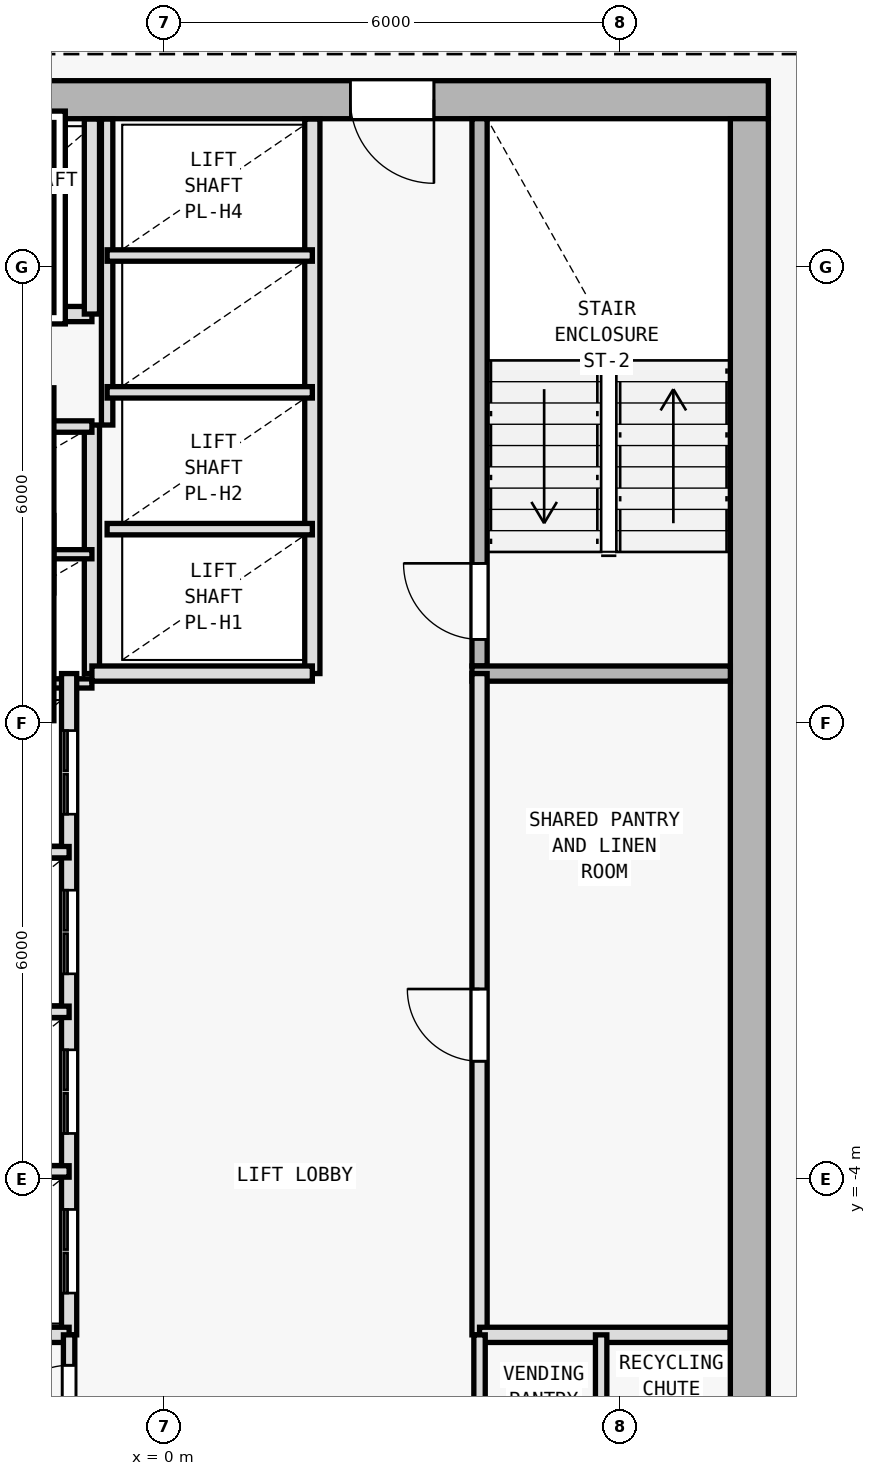
"""IFC4 building model, lengths in metres.
Left out: names, types, materials, properties, quantities, classifications, styles, units other than length and angle.
Written with IfcOpenShell. Run it as: python <this file> out.ifc"""

import sys

from ifc_helpers import new_model, si_unit, direction, frame, frame_2d, origin, origin_2d, place, context, subcontext, project, spatial, rectangle, i_section, extrude, element, fill, save


model = new_model("IFC4")
c1 = context("Model", 3, precision=1e-05, world=origin(), true_north=direction((0.0, 1.0)))
c2 = subcontext(c1, "Body", "Model", "MODEL_VIEW")
j1 = project(units=[si_unit("LENGTHUNIT", "METRE"), si_unit("PLANEANGLEUNIT", "RADIAN")], contexts=[c1])
p1 = place(None, origin())
s1 = spatial("IfcSite", under=j1, at=p1, CompositionType="ELEMENT")
p2 = place(p1, origin())
s2 = spatial("IfcBuilding", under=s1, at=p2, CompositionType="ELEMENT")
p3 = place(p2, frame((0.0, 0.0, 167.4)))
s3 = spatial("IfcBuildingStorey", under=s2, at=p3, CompositionType="ELEMENT", Elevation=167.4)
for number, where, z_axis, x_axis in (
    (1, (7.7, 10.2, 0.0), (0.0, 0.0, 1.0), (1.0, 0.0, 0.0)),
    (2, (7.7, 0.4, 0.0), (0.0, 0.0, 1.0), (1.0, 0.0, 0.0)),
):
    element("IfcColumn", number, at=place(p3, frame(where, z_axis=z_axis, x_axis=x_axis)), inside=s3, PredefinedType="COLUMN", context=c2, shape_type="SweptSolid", body=[
        extrude(i_section(OverallWidth=0.404, OverallDepth=0.407, WebThickness=0.017, FlangeThickness=0.028, FilletRadius=0.015, at=origin_2d()), origin(), (0.0, 0.0, 1.0), 3.6),
    ])
p4 = place(p3, frame((7.95, 10.2, 0.0), z_axis=(0.0, 0.0, 1.0), x_axis=(-1.0, 0.0, 0.0)))
e3 = element("IfcWall", 3, at=p4, inside=s3, PredefinedType="SHEAR", context=c2, shape_type="SweptSolid", body=[
    extrude(rectangle(XDim=15.9, YDim=0.5, at=frame_2d((7.95, 0.0))), origin(), (0.0, 0.0, 1.0), 3.35),
])
p5 = place(p4, frame((4.4, 0.0, 0.0)))
e4 = element("IfcOpeningElement", 4, at=p5, cuts=e3, PredefinedType="OPENING", context=c2, shape_type="SweptSolid", body=[
    extrude(rectangle(XDim=1.1, YDim=2.15, at=frame_2d((0.55, 1.075))), frame((0.0, 0.26, 0.0), z_axis=(0.0, -1.0, 0.0), x_axis=(1.0, 0.0, 0.0)), (0.0, 0.0, 1.0), 0.52),
])
p6 = place(p3, frame((7.7, 9.95, 0.0), z_axis=(0.0, 0.0, 1.0), x_axis=(0.0, -1.0, 0.0)))
e5 = element("IfcWall", 5, at=p6, inside=s3, PredefinedType="SHEAR", context=c2, shape_type="SweptSolid", body=[
    extrude(rectangle(XDim=19.1, YDim=0.5, at=frame_2d((9.55, 0.0))), origin(), (0.0, 0.0, 1.0), 3.35),
])
p7 = place(p3, frame((4.15, 2.75, 0.0), z_axis=(0.0, 0.0, 1.0), x_axis=(0.0, 1.0, 0.0)))
e6 = element("IfcWall", 6, at=p7, inside=s3, PredefinedType="SOLIDWALL", context=c2, shape_type="SweptSolid", body=[
    extrude(rectangle(XDim=7.2, YDim=0.2, at=frame_2d((3.6, 0.0))), origin(), (0.0, 0.0, 1.0), 3.35),
])
p8 = place(p7, frame((0.35, 0.0, 0.0)))
e7 = element("IfcOpeningElement", 7, at=p8, cuts=e6, PredefinedType="OPENING", context=c2, shape_type="SweptSolid", body=[
    extrude(rectangle(XDim=1.0, YDim=2.15, at=frame_2d((0.5, 1.075))), frame((0.0, 0.11, 0.0), z_axis=(0.0, -1.0, 0.0), x_axis=(1.0, 0.0, 0.0)), (0.0, 0.0, 1.0), 0.22),
])
p9 = place(p3, frame((4.05, 2.65, 0.0), z_axis=(0.0, 0.0, 1.0), x_axis=(1.0, 0.0, 0.0)))
e8 = element("IfcWall", 8, at=p9, inside=s3, PredefinedType="SOLIDWALL", context=c2, shape_type="SweptSolid", body=[
    extrude(rectangle(XDim=3.4, YDim=0.2, at=frame_2d((1.7, 0.0))), origin(), (0.0, 0.0, 1.0), 3.35),
])
p10 = place(p3, frame((-0.95, 2.65, 0.0), z_axis=(0.0, 0.0, 1.0), x_axis=(0.0, 1.0, 0.0)))
e9 = element("IfcWall", 9, at=p10, inside=s3, PredefinedType="SOLIDWALL", context=c2, shape_type="SweptSolid", body=[
    extrude(rectangle(XDim=3.27, YDim=0.2, at=frame_2d((1.635, 0.0))), origin(), (0.0, 0.0, 1.0), 3.35),
])
for number, where, z_axis, x_axis in (
    (10, (-3.85, 2.52, 0.0), (0.0, 0.0, 1.0), (1.0, 0.0, 0.0)),
    (11, (-3.85, 4.22, 0.0), (0.0, 0.0, 1.0), (1.0, 0.0, 0.0)),
):
    element("IfcWall", number, at=place(p3, frame(where, z_axis=z_axis, x_axis=x_axis)), inside=s3, PredefinedType="PARTITIONING", context=c2, shape_type="SweptSolid", body=[
        extrude(rectangle(XDim=2.9, YDim=0.12, at=frame_2d((1.45, 0.0))), origin(), (0.0, 0.0, 1.0), 3.35),
    ])
p11 = place(p3, frame((-3.85, 5.9, 0.0), z_axis=(0.0, 0.0, 1.0), x_axis=(1.0, 0.0, 0.0)))
e12 = element("IfcWall", 12, at=p11, inside=s3, PredefinedType="PARTITIONING", context=c2, shape_type="SweptSolid", body=[
    extrude(rectangle(XDim=2.9, YDim=0.15, at=frame_2d((1.45, 0.0))), origin(), (0.0, 0.0, 1.0), 3.35),
])
p12 = place(p3, frame((-3.85, 7.38, 0.0), z_axis=(0.0, 0.0, 1.0), x_axis=(1.0, 0.0, 0.0)))
e13 = element("IfcWall", 13, at=p12, inside=s3, PredefinedType="SOLIDWALL", context=c2, shape_type="SweptSolid", body=[
    extrude(rectangle(XDim=2.9, YDim=0.2, at=frame_2d((1.45, 0.0))), origin(), (0.0, 0.0, 1.0), 3.35),
])
p13 = place(p12, frame((0.85, 0.0, 0.0)))
e14 = element("IfcOpeningElement", 14, at=p13, cuts=e13, PredefinedType="OPENING", context=c2, shape_type="SweptSolid", body=[
    extrude(rectangle(XDim=1.2, YDim=2.2, at=frame_2d((0.6, 1.1))), frame((0.0, 0.11, 0.0), z_axis=(0.0, -1.0, 0.0), x_axis=(1.0, 0.0, 0.0)), (0.0, 0.0, 1.0), 0.22),
])
p14 = place(p3, frame((-0.95, 7.38, 0.0), z_axis=(0.0, 0.0, 1.0), x_axis=(0.0, 1.0, 0.0)))
e15 = element("IfcWall", 15, at=p14, inside=s3, PredefinedType="SOLIDWALL", context=c2, shape_type="SweptSolid", body=[
    extrude(rectangle(XDim=2.565, YDim=0.2, at=frame_2d((1.283, 0.0))), origin(), (0.0, 0.0, 1.0), 3.35),
])
p15 = place(p3, frame((4.15, -6.05, 0.0), z_axis=(0.0, 0.0, 1.0), x_axis=(0.0, 1.0, 0.0)))
e16 = element("IfcWall", 16, at=p15, inside=s3, PredefinedType="SOLIDWALL", context=c2, shape_type="SweptSolid", body=[
    extrude(rectangle(XDim=8.7, YDim=0.2, at=frame_2d((4.35, 0.0))), origin(), (0.0, 0.0, 1.0), 3.35),
])
p16 = place(p15, frame((3.6, 0.0, 0.0)))
e17 = element("IfcOpeningElement", 17, at=p16, cuts=e16, PredefinedType="OPENING", context=c2, shape_type="SweptSolid", body=[
    extrude(rectangle(XDim=0.95, YDim=2.1, at=frame_2d((0.475, 1.05))), frame((0.0, 0.11, 0.0), z_axis=(0.0, -1.0, 0.0), x_axis=(1.0, 0.0, 0.0)), (0.0, 0.0, 1.0), 0.22),
])
p17 = place(p3, frame((-1.25, -6.05, 0.0), z_axis=(0.0, 0.0, 1.0), x_axis=(0.0, 1.0, 0.0)))
e18 = element("IfcWall", 18, at=p17, inside=s3, PredefinedType="SOLIDWALL", context=c2, shape_type="SweptSolid", body=[
    extrude(rectangle(XDim=8.7, YDim=0.2, at=frame_2d((4.35, 0.0))), origin(), (0.0, 0.0, 1.0), 3.35),
])
p18 = place(p17, frame((0.55, 0.0, 0.0)))
e19 = element("IfcOpeningElement", 19, at=p18, cuts=e18, PredefinedType="OPENING", context=c2, shape_type="SweptSolid", body=[
    extrude(rectangle(XDim=1.1, YDim=2.15, at=frame_2d((0.55, 1.075))), frame((0.0, 0.11, 0.0), z_axis=(0.0, -1.0, 0.0), x_axis=(1.0, 0.0, 0.0)), (0.0, 0.0, 1.0), 0.22),
])
p19 = place(p17, frame((2.65, 0.0, 0.0)))
e20 = element("IfcOpeningElement", 20, at=p19, cuts=e18, PredefinedType="OPENING", context=c2, shape_type="SweptSolid", body=[
    extrude(rectangle(XDim=1.1, YDim=2.15, at=frame_2d((0.55, 1.075))), frame((0.0, 0.11, 0.0), z_axis=(0.0, -1.0, 0.0), x_axis=(1.0, 0.0, 0.0)), (0.0, 0.0, 1.0), 0.22),
])
p20 = place(p17, frame((4.75, 0.0, 0.0)))
e21 = element("IfcOpeningElement", 21, at=p20, cuts=e18, PredefinedType="OPENING", context=c2, shape_type="SweptSolid", body=[
    extrude(rectangle(XDim=1.1, YDim=2.15, at=frame_2d((0.55, 1.075))), frame((0.0, 0.11, 0.0), z_axis=(0.0, -1.0, 0.0), x_axis=(1.0, 0.0, 0.0)), (0.0, 0.0, 1.0), 0.22),
])
p21 = place(p17, frame((6.85, 0.0, 0.0)))
e22 = element("IfcOpeningElement", 22, at=p21, cuts=e18, PredefinedType="OPENING", context=c2, shape_type="SweptSolid", body=[
    extrude(rectangle(XDim=1.1, YDim=2.15, at=frame_2d((0.55, 1.075))), frame((0.0, 0.11, 0.0), z_axis=(0.0, -1.0, 0.0), x_axis=(1.0, 0.0, 0.0)), (0.0, 0.0, 1.0), 0.22),
])
for number, where, z_axis, x_axis in (
    (23, (-4.15, -3.9, 0.0), (0.0, 0.0, 1.0), (1.0, 0.0, 0.0)),
    (24, (-4.15, -1.8, 0.0), (0.0, 0.0, 1.0), (1.0, 0.0, 0.0)),
    (25, (-4.15, 0.3, 0.0), (0.0, 0.0, 1.0), (1.0, 0.0, 0.0)),
):
    element("IfcWall", number, at=place(p3, frame(where, z_axis=z_axis, x_axis=x_axis)), inside=s3, PredefinedType="PARTITIONING", context=c2, shape_type="SweptSolid", body=[
        extrude(rectangle(XDim=2.9, YDim=0.15, at=frame_2d((1.45, 0.0))), origin(), (0.0, 0.0, 1.0), 3.35),
    ])
p22 = place(p3, frame((1.95, 2.65, 0.0), z_axis=(0.0, 0.0, 1.0), x_axis=(0.0, 1.0, 0.0)))
e26 = element("IfcWall", 26, at=p22, inside=s3, PredefinedType="SOLIDWALL", context=c2, shape_type="SweptSolid", body=[
    extrude(rectangle(XDim=7.295, YDim=0.2, at=frame_2d((3.647, 0.0))), origin(), (0.0, 0.0, 1.0), 3.35),
])
p23 = place(p3, frame((-0.95, 2.65, 0.0), z_axis=(0.0, 0.0, 1.0), x_axis=(1.0, 0.0, 0.0)))
e27 = element("IfcWall", 27, at=p23, inside=s3, PredefinedType="SOLIDWALL", context=c2, shape_type="SweptSolid", body=[
    extrude(rectangle(XDim=2.9, YDim=0.2, at=frame_2d((1.45, 0.0))), origin(), (0.0, 0.0, 1.0), 3.35),
])
p24 = place(p3, frame((-0.75, 5.92, 0.0), z_axis=(0.0, 0.0, 1.0), x_axis=(0.0, 1.0, 0.0)))
e28 = element("IfcWall", 28, at=p24, inside=s3, PredefinedType="PARTITIONING", context=c2, shape_type="SweptSolid", body=[
    extrude(rectangle(XDim=4.025, YDim=0.15, at=frame_2d((2.013, 0.0))), origin(), (0.0, 0.0, 1.0), 3.35),
])
for number, where, z_axis, x_axis in (
    (29, (-0.75, 4.55, 0.0), (0.0, 0.0, 1.0), (1.0, 0.0, 0.0)),
    (30, (-0.75, 6.35, 0.0), (0.0, 0.0, 1.0), (1.0, 0.0, 0.0)),
    (31, (-0.75, 8.15, 0.0), (0.0, 0.0, 1.0), (1.0, 0.0, 0.0)),
):
    element("IfcWall", number, at=place(p3, frame(where, z_axis=z_axis, x_axis=x_axis)), inside=s3, PredefinedType="PARTITIONING", context=c2, shape_type="SweptSolid", body=[
        extrude(rectangle(XDim=2.7, YDim=0.15, at=frame_2d((1.35, 0.0))), origin(), (0.0, 0.0, 1.0), 3.35),
    ])
p25 = place(p3, frame((-4.04, -6.05, 0.0), z_axis=(0.0, 0.0, 1.0), x_axis=(1.0, 0.0, 0.0)))
e32 = element("IfcWall", 32, at=p25, inside=s3, PredefinedType="SOLIDWALL", context=c2, shape_type="SweptSolid", body=[
    extrude(rectangle(XDim=2.79, YDim=0.2, at=frame_2d((1.395, 0.0))), origin(), (0.0, 0.0, 1.0), 3.35),
])
p26 = place(p3, frame((4.15, -6.05, 0.0), z_axis=(0.0, 0.0, 1.0), x_axis=(1.0, 0.0, 0.0)))
e33 = element("IfcWall", 33, at=p26, inside=s3, PredefinedType="SOLIDWALL", context=c2, shape_type="SweptSolid", body=[
    extrude(rectangle(XDim=3.295, YDim=0.2, at=frame_2d((1.647, 0.0))), origin(), (0.0, 0.0, 1.0), 3.35),
])
p27 = place(p3, frame((-1.25, -9.145, 0.0), z_axis=(0.0, 0.0, 1.0), x_axis=(0.0, 1.0, 0.0)))
e34 = element("IfcWall", 34, at=p27, inside=s3, PredefinedType="PARTITIONING", context=c2, shape_type="SweptSolid", body=[
    extrude(rectangle(XDim=3.095, YDim=0.15, at=frame_2d((1.547, 0.0))), origin(), (0.0, 0.0, 1.0), 3.35),
])
p28 = place(p27, frame((1.795, 0.0, 0.0)))
e35 = element("IfcOpeningElement", 35, at=p28, cuts=e34, PredefinedType="OPENING", context=c2, shape_type="SweptSolid", body=[
    extrude(rectangle(XDim=0.9, YDim=2.1, at=frame_2d((0.45, 1.05))), frame((0.0, 0.085, 0.0), z_axis=(0.0, -1.0, 0.0), x_axis=(1.0, 0.0, 0.0)), (0.0, 0.0, 1.0), 0.17),
])
p29 = place(p27, frame((0.245, 0.0, 0.0)))
e36 = element("IfcOpeningElement", 36, at=p29, cuts=e34, PredefinedType="OPENING", context=c2, shape_type="SweptSolid", body=[
    extrude(rectangle(XDim=0.9, YDim=2.1, at=frame_2d((0.45, 1.05))), frame((0.0, 0.085, 0.0), z_axis=(0.0, -1.0, 0.0), x_axis=(1.0, 0.0, 0.0)), (0.0, 0.0, 1.0), 0.17),
])
p30 = place(p3, frame((4.15, -9.145, 0.0), z_axis=(0.0, 0.0, 1.0), x_axis=(0.0, 1.0, 0.0)))
e37 = element("IfcWall", 37, at=p30, inside=s3, PredefinedType="PARTITIONING", context=c2, shape_type="SweptSolid", body=[
    extrude(rectangle(XDim=3.095, YDim=0.15, at=frame_2d((1.547, 0.0))), origin(), (0.0, 0.0, 1.0), 3.35),
])
p31 = place(p30, frame((0.845, 0.0, 0.0)))
e38 = element("IfcOpeningElement", 38, at=p31, cuts=e37, PredefinedType="OPENING", context=c2, shape_type="SweptSolid", body=[
    extrude(rectangle(XDim=0.9, YDim=2.1, at=frame_2d((0.45, 1.05))), frame((0.0, 0.085, 0.0), z_axis=(0.0, -1.0, 0.0), x_axis=(1.0, 0.0, 0.0)), (0.0, 0.0, 1.0), 0.17),
])
p32 = place(p3, frame((5.75, -9.145, 0.0), z_axis=(0.0, 0.0, 1.0), x_axis=(0.0, 1.0, 0.0)))
e39 = element("IfcWall", 39, at=p32, inside=s3, PredefinedType="PARTITIONING", context=c2, shape_type="SweptSolid", body=[
    extrude(rectangle(XDim=3.095, YDim=0.15, at=frame_2d((1.547, 0.0))), origin(), (0.0, 0.0, 1.0), 3.35),
])
p33 = place(p32, frame((0.845, 0.0, 0.0)))
e40 = element("IfcOpeningElement", 40, at=p33, cuts=e39, PredefinedType="OPENING", context=c2, shape_type="SweptSolid", body=[
    extrude(rectangle(XDim=0.9, YDim=2.1, at=frame_2d((0.45, 1.05))), frame((0.0, 0.085, 0.0), z_axis=(0.0, -1.0, 0.0), x_axis=(1.0, 0.0, 0.0)), (0.0, 0.0, 1.0), 0.17),
])
p34 = place(p3, frame((7.023, 12.36, 0.0), z_axis=(0.0, 0.0, 1.0), x_axis=(0.84376480085, -0.536713108511, 0.0)))
e41 = element("IfcWall", 41, at=p34, inside=s3, PredefinedType="PARTITIONING", context=c2, shape_type="SweptSolid", body=[
    extrude(rectangle(XDim=7.297, YDim=0.15, at=frame_2d((3.648, 0.0))), origin(), (0.0, 0.0, 1.0), 2.935),
])
p35 = place(p5, origin())
e42 = element("IfcDoor", 42, at=p35, inside=s3, OperationType="SINGLE_SWING_LEFT", PredefinedType="DOOR", context=c2, shape_type="SweptSolid", body=[
    extrude(rectangle(XDim=1.1, YDim=2.15, at=frame_2d((0.55, 1.075))), frame((0.0, 0.025, 0.0), z_axis=(0.0, -1.0, 0.0), x_axis=(1.0, 0.0, 0.0)), (0.0, 0.0, 1.0), 0.05),
])
fill(e4, e42)
p36 = place(p8, origin())
e43 = element("IfcDoor", 43, at=p36, inside=s3, OperationType="SINGLE_SWING_RIGHT", PredefinedType="DOOR", context=c2, shape_type="SweptSolid", body=[
    extrude(rectangle(XDim=1.0, YDim=2.15, at=frame_2d((0.5, 1.075))), frame((0.0, 0.025, 0.0), z_axis=(0.0, -1.0, 0.0), x_axis=(1.0, 0.0, 0.0)), (0.0, 0.0, 1.0), 0.05),
])
fill(e7, e43)
p37 = place(p16, origin())
e44 = element("IfcDoor", 44, at=p37, inside=s3, OperationType="SINGLE_SWING_RIGHT", PredefinedType="DOOR", context=c2, shape_type="SweptSolid", body=[
    extrude(rectangle(XDim=0.95, YDim=2.1, at=frame_2d((0.475, 1.05))), frame((0.0, 0.025, 0.0), z_axis=(0.0, -1.0, 0.0), x_axis=(1.0, 0.0, 0.0)), (0.0, 0.0, 1.0), 0.05),
])
fill(e17, e44)
p38 = place(p18, origin())
e45 = element("IfcDoor", 45, at=p38, inside=s3, OperationType="DOUBLE_DOOR_SLIDING", PredefinedType="DOOR", context=c2, shape_type="SweptSolid", body=[
    extrude(rectangle(XDim=1.1, YDim=2.15, at=frame_2d((0.55, 1.075))), frame((0.0, 0.025, 0.0), z_axis=(0.0, -1.0, 0.0), x_axis=(1.0, 0.0, 0.0)), (0.0, 0.0, 1.0), 0.05),
])
fill(e19, e45)
p39 = place(p19, origin())
e46 = element("IfcDoor", 46, at=p39, inside=s3, OperationType="DOUBLE_DOOR_SLIDING", PredefinedType="DOOR", context=c2, shape_type="SweptSolid", body=[
    extrude(rectangle(XDim=1.1, YDim=2.15, at=frame_2d((0.55, 1.075))), frame((0.0, 0.025, 0.0), z_axis=(0.0, -1.0, 0.0), x_axis=(1.0, 0.0, 0.0)), (0.0, 0.0, 1.0), 0.05),
])
fill(e20, e46)
p40 = place(p20, origin())
e47 = element("IfcDoor", 47, at=p40, inside=s3, OperationType="DOUBLE_DOOR_SLIDING", PredefinedType="DOOR", context=c2, shape_type="SweptSolid", body=[
    extrude(rectangle(XDim=1.1, YDim=2.15, at=frame_2d((0.55, 1.075))), frame((0.0, 0.025, 0.0), z_axis=(0.0, -1.0, 0.0), x_axis=(1.0, 0.0, 0.0)), (0.0, 0.0, 1.0), 0.05),
])
fill(e21, e47)
p41 = place(p21, origin())
e48 = element("IfcDoor", 48, at=p41, inside=s3, OperationType="DOUBLE_DOOR_SLIDING", PredefinedType="DOOR", context=c2, shape_type="SweptSolid", body=[
    extrude(rectangle(XDim=1.1, YDim=2.15, at=frame_2d((0.55, 1.075))), frame((0.0, 0.025, 0.0), z_axis=(0.0, -1.0, 0.0), x_axis=(1.0, 0.0, 0.0)), (0.0, 0.0, 1.0), 0.05),
])
fill(e22, e48)
p42 = place(p28, origin())
e49 = element("IfcDoor", 49, at=p42, inside=s3, OperationType="SINGLE_SWING_LEFT", PredefinedType="DOOR", context=c2, shape_type="SweptSolid", body=[
    extrude(rectangle(XDim=0.9, YDim=2.1, at=frame_2d((0.45, 1.05))), frame((0.0, 0.025, 0.0), z_axis=(0.0, -1.0, 0.0), x_axis=(1.0, 0.0, 0.0)), (0.0, 0.0, 1.0), 0.05),
])
fill(e35, e49)
save(model, sys.argv[1])
